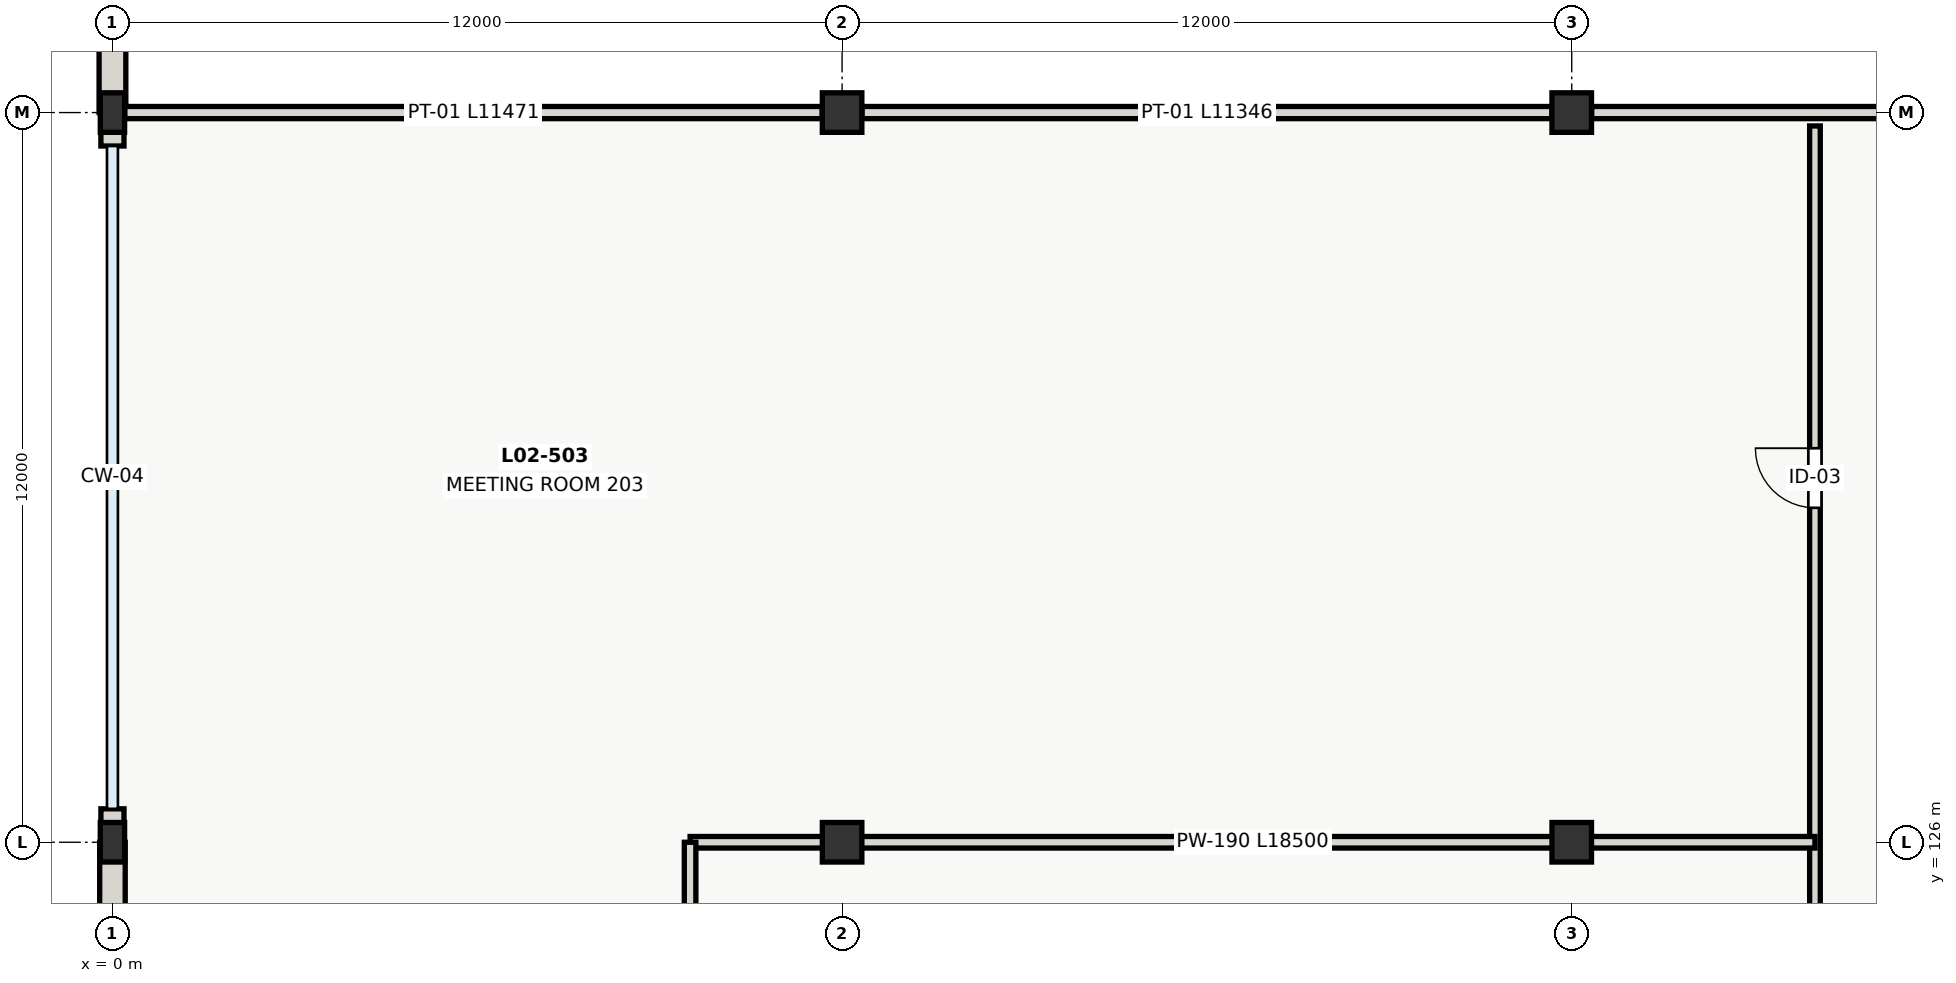
"""IFC4 building model, lengths in metres.
Left out: names, types, materials, properties, quantities, classifications, styles, units other than length and angle.
Written with IfcOpenShell. Run it as: python <this file> out.ifc"""

import sys

from ifc_helpers import new_model, si_unit, direction, frame, frame_2d, origin, origin_2d, place, context, subcontext, project, spatial, rectangle, extrude, element, fill, save


model = new_model("IFC4")
c1 = context("Model", 3, precision=1e-05, world=origin(), true_north=direction((0.0, 1.0)))
c2 = subcontext(c1, "Body", "Model", "MODEL_VIEW")
j1 = project(units=[si_unit("LENGTHUNIT", "METRE"), si_unit("PLANEANGLEUNIT", "RADIAN")], contexts=[c1])
p1 = place(None, origin())
s1 = spatial("IfcSite", under=j1, at=p1, CompositionType="ELEMENT")
p2 = place(p1, origin())
s2 = spatial("IfcBuilding", under=s1, at=p2, CompositionType="ELEMENT")
p3 = place(p2, frame((0.0, 0.0, 4.2)))
s3 = spatial("IfcBuildingStorey", under=s2, at=p3, CompositionType="ELEMENT", Elevation=4.2)
p4 = place(p3, frame((0.0, 126.0, 0.0), z_axis=(0.0, 0.0, 1.0), x_axis=(1.0, 0.0, 0.0)))
e1 = element("IfcColumn", 1, at=p4, inside=s3, PredefinedType="PILASTER", context=c2, shape_type="SweptSolid", body=[
    extrude(rectangle(XDim=0.4, YDim=0.65, at=origin_2d()), origin(), (0.0, 0.0, 1.0), 4.2),
])
for number, where, z_axis, x_axis in (
    (2, (12.0, 126.0, 0.0), (0.0, 0.0, 1.0), (1.0, 0.0, 0.0)),
    (3, (24.0, 126.0, 0.0), (0.0, 0.0, 1.0), (1.0, 0.0, 0.0)),
):
    element("IfcColumn", number, at=place(p3, frame(where, z_axis=z_axis, x_axis=x_axis)), inside=s3, PredefinedType="COLUMN", context=c2, shape_type="SweptSolid", body=[
        extrude(rectangle(XDim=0.65, YDim=0.65, at=origin_2d()), origin(), (0.0, 0.0, 1.0), 4.2),
    ])
p5 = place(p3, frame((0.0, 138.0, 0.0), z_axis=(0.0, 0.0, 1.0), x_axis=(1.0, 0.0, 0.0)))
e4 = element("IfcColumn", 4, at=p5, inside=s3, PredefinedType="PILASTER", context=c2, shape_type="SweptSolid", body=[
    extrude(rectangle(XDim=0.4, YDim=0.65, at=origin_2d()), origin(), (0.0, 0.0, 1.0), 4.2),
])
for number, where, z_axis, x_axis in (
    (5, (12.0, 138.0, 0.0), (0.0, 0.0, 1.0), (1.0, 0.0, 0.0)),
    (6, (24.0, 138.0, 0.0), (0.0, 0.0, 1.0), (1.0, 0.0, 0.0)),
):
    element("IfcColumn", number, at=place(p3, frame(where, z_axis=z_axis, x_axis=x_axis)), inside=s3, PredefinedType="COLUMN", context=c2, shape_type="SweptSolid", body=[
        extrude(rectangle(XDim=0.65, YDim=0.65, at=origin_2d()), origin(), (0.0, 0.0, 1.0), 4.2),
    ])
p6 = place(p3, frame((0.0, 120.0, 0.0), z_axis=(0.0, 0.0, 1.0), x_axis=(0.0, 1.0, 0.0)))
e7 = element("IfcWall", 7, at=p6, inside=s3, PredefinedType="SOLIDWALL", context=c2, shape_type="SweptSolid", body=[
    extrude(rectangle(XDim=6.0, YDim=0.42, at=frame_2d((3.0, 0.0))), origin(), (0.0, 0.0, 1.0), 3.56),
])
p7 = place(p6, frame((2.0, 0.0, 0.9)))
e8 = element("IfcOpeningElement", 8, at=p7, cuts=e7, PredefinedType="OPENING", context=c2, shape_type="SweptSolid", body=[
    extrude(rectangle(XDim=2.0, YDim=2.05, at=frame_2d((1.0, 1.025))), frame((0.0, 0.22, 0.0), z_axis=(0.0, -1.0, 0.0), x_axis=(1.0, 0.0, 0.0)), (0.0, 0.0, 1.0), 0.44),
])
for number, where, z_axis, x_axis in (
    (9, (0.0, 126.002, 0.0), (0.0, 0.0, 1.0), (0.0, 1.0, 0.0)),
    (10, (0.0, 137.45, 0.0), (0.0, 0.0, 1.0), (0.0, 1.0, 0.0)),
):
    element("IfcWall", number, at=place(p3, frame(where, z_axis=z_axis, x_axis=x_axis)), inside=s3, PredefinedType="SOLIDWALL", context=c2, shape_type="SweptSolid", body=[
        extrude(rectangle(XDim=0.548, YDim=0.38, at=frame_2d((0.274, 0.0))), origin(), (0.0, 0.0, 1.0), 3.5),
    ])
p8 = place(p3, frame((0.0, 138.0, 0.95), z_axis=(0.0, 0.0, 1.0), x_axis=(0.0, 1.0, 0.0)))
e11 = element("IfcWall", 11, at=p8, inside=s3, PredefinedType="SHEAR", context=c2, shape_type="SweptSolid", body=[
    extrude(rectangle(XDim=12.0, YDim=0.44, at=frame_2d((6.0, 0.0))), origin(), (0.0, 0.0, 1.0), 3.25),
])
p9 = place(p8, frame((2.7, 0.0, 0.9)))
e12 = element("IfcOpeningElement", 12, at=p9, cuts=e11, PredefinedType="OPENING", context=c2, shape_type="SweptSolid", body=[
    extrude(rectangle(XDim=1.8, YDim=1.05, at=frame_2d((0.9, 0.525))), frame((0.0, 0.23, 0.0), z_axis=(0.0, -1.0, 0.0), x_axis=(1.0, 0.0, 0.0)), (0.0, 0.0, 1.0), 0.46),
])
p10 = place(p8, frame((7.5, 0.0, 0.9)))
e13 = element("IfcOpeningElement", 13, at=p10, cuts=e11, PredefinedType="OPENING", context=c2, shape_type="SweptSolid", body=[
    extrude(rectangle(XDim=1.8, YDim=1.05, at=frame_2d((0.9, 0.525))), frame((0.0, 0.23, 0.0), z_axis=(0.0, -1.0, 0.0), x_axis=(1.0, 0.0, 0.0)), (0.0, 0.0, 1.0), 0.46),
])
p11 = place(p3, frame((0.202, 138.0, 0.0), z_axis=(0.0, 0.0, 1.0), x_axis=(1.0, 0.0, 0.0)))
e14 = element("IfcWall", 14, at=p11, inside=s3, PredefinedType="PARTITIONING", context=c2, shape_type="SweptSolid", body=[
    extrude(rectangle(XDim=11.471, YDim=0.2, at=frame_2d((5.736, 0.0))), origin(), (0.0, 0.0, 1.0), 3.56),
])
for number, where, z_axis, x_axis in (
    (15, (12.327, 138.0, 0.0), (0.0, 0.0, 1.0), (1.0, 0.0, 0.0)),
    (16, (24.327, 138.0, 0.0), (0.0, 0.0, 1.0), (1.0, 0.0, 0.0)),
):
    element("IfcWall", number, at=place(p3, frame(where, z_axis=z_axis, x_axis=x_axis)), inside=s3, PredefinedType="PARTITIONING", context=c2, shape_type="SweptSolid", body=[
        extrude(rectangle(XDim=11.346, YDim=0.2, at=frame_2d((5.673, 0.0))), origin(), (0.0, 0.0, 1.0), 3.56),
    ])
p12 = place(p3, frame((28.0, 84.22, 0.0), z_axis=(0.0, 0.0, 1.0), x_axis=(0.0, 1.0, 0.0)))
e17 = element("IfcWall", 17, at=p12, inside=s3, PredefinedType="PARTITIONING", context=c2, shape_type="SweptSolid", body=[
    extrude(rectangle(XDim=53.56, YDim=0.175, at=frame_2d((26.78, 0.0))), origin(), (0.0, 0.0, 1.0), 3.72),
])
p13 = place(p12, frame((1.98, 0.0, 0.0)))
e18 = element("IfcOpeningElement", 18, at=p13, cuts=e17, PredefinedType="OPENING", context=c2, shape_type="SweptSolid", body=[
    extrude(rectangle(XDim=1.05, YDim=2.1, at=frame_2d((0.525, 1.05))), frame((0.0, 0.097, 0.0), z_axis=(0.0, -1.0, 0.0), x_axis=(1.0, 0.0, 0.0)), (0.0, 0.0, 1.0), 0.195),
])
p14 = place(p12, frame((10.28, 0.0, 0.0)))
e19 = element("IfcOpeningElement", 19, at=p14, cuts=e17, PredefinedType="OPENING", context=c2, shape_type="SweptSolid", body=[
    extrude(rectangle(XDim=1.8, YDim=2.15, at=frame_2d((0.9, 1.075))), frame((0.0, 0.097, 0.0), z_axis=(0.0, -1.0, 0.0), x_axis=(1.0, 0.0, 0.0)), (0.0, 0.0, 1.0), 0.195),
])
p15 = place(p12, frame((14.58, 0.0, 0.0)))
e20 = element("IfcOpeningElement", 20, at=p15, cuts=e17, PredefinedType="OPENING", context=c2, shape_type="SweptSolid", body=[
    extrude(rectangle(XDim=1.05, YDim=2.1, at=frame_2d((0.525, 1.05))), frame((0.0, 0.097, 0.0), z_axis=(0.0, -1.0, 0.0), x_axis=(1.0, 0.0, 0.0)), (0.0, 0.0, 1.0), 0.195),
])
p16 = place(p12, frame((25.78, 0.0, 0.0)))
e21 = element("IfcOpeningElement", 21, at=p16, cuts=e17, PredefinedType="OPENING", context=c2, shape_type="SweptSolid", body=[
    extrude(rectangle(XDim=1.05, YDim=2.1, at=frame_2d((0.525, 1.05))), frame((0.0, 0.097, 0.0), z_axis=(0.0, -1.0, 0.0), x_axis=(1.0, 0.0, 0.0)), (0.0, 0.0, 1.0), 0.195),
])
p17 = place(p12, frame((37.98, 0.0, 0.0)))
e22 = element("IfcOpeningElement", 22, at=p17, cuts=e17, PredefinedType="OPENING", context=c2, shape_type="SweptSolid", body=[
    extrude(rectangle(XDim=1.0, YDim=2.1, at=frame_2d((0.5, 1.05))), frame((0.0, 0.097, 0.0), z_axis=(0.0, -1.0, 0.0), x_axis=(1.0, 0.0, 0.0)), (0.0, 0.0, 1.0), 0.195),
])
p18 = place(p12, frame((47.28, 0.0, 0.0)))
e23 = element("IfcOpeningElement", 23, at=p18, cuts=e17, PredefinedType="OPENING", context=c2, shape_type="SweptSolid", body=[
    extrude(rectangle(XDim=0.98, YDim=2.1, at=frame_2d((0.49, 1.05))), frame((0.0, 0.097, 0.0), z_axis=(0.0, -1.0, 0.0), x_axis=(1.0, 0.0, 0.0)), (0.0, 0.0, 1.0), 0.195),
])
p19 = place(p3, frame((9.5, 126.0, 0.0), z_axis=(0.0, 0.0, 1.0), x_axis=(1.0, 0.0, 0.0)))
e24 = element("IfcWall", 24, at=p19, inside=s3, PredefinedType="PLUMBINGWALL", context=c2, shape_type="SweptSolid", body=[
    extrude(rectangle(XDim=18.5, YDim=0.19, at=frame_2d((9.25, 0.0))), origin(), (0.0, 0.0, 1.0), 3.4),
])
p20 = place(p3, frame((9.5, 120.0, 0.0), z_axis=(0.0, 0.0, 1.0), x_axis=(0.0, 1.0, 0.0)))
e25 = element("IfcWall", 25, at=p20, inside=s3, PredefinedType="PLUMBINGWALL", context=c2, shape_type="SweptSolid", body=[
    extrude(rectangle(XDim=6.0, YDim=0.19, at=frame_2d((3.0, 0.0))), origin(), (0.0, 0.0, 1.0), 3.72),
])
p21 = place(p18, origin())
e26 = element("IfcDoor", 26, at=p21, inside=s3, OperationType="SINGLE_SWING_RIGHT", PredefinedType="DOOR", context=c2, shape_type="SweptSolid", body=[
    extrude(rectangle(XDim=0.98, YDim=2.1, at=frame_2d((0.49, 1.05))), frame((0.0, 0.025, 0.0), z_axis=(0.0, -1.0, 0.0), x_axis=(1.0, 0.0, 0.0)), (0.0, 0.0, 1.0), 0.05),
])
fill(e23, e26)
save(model, sys.argv[1])
